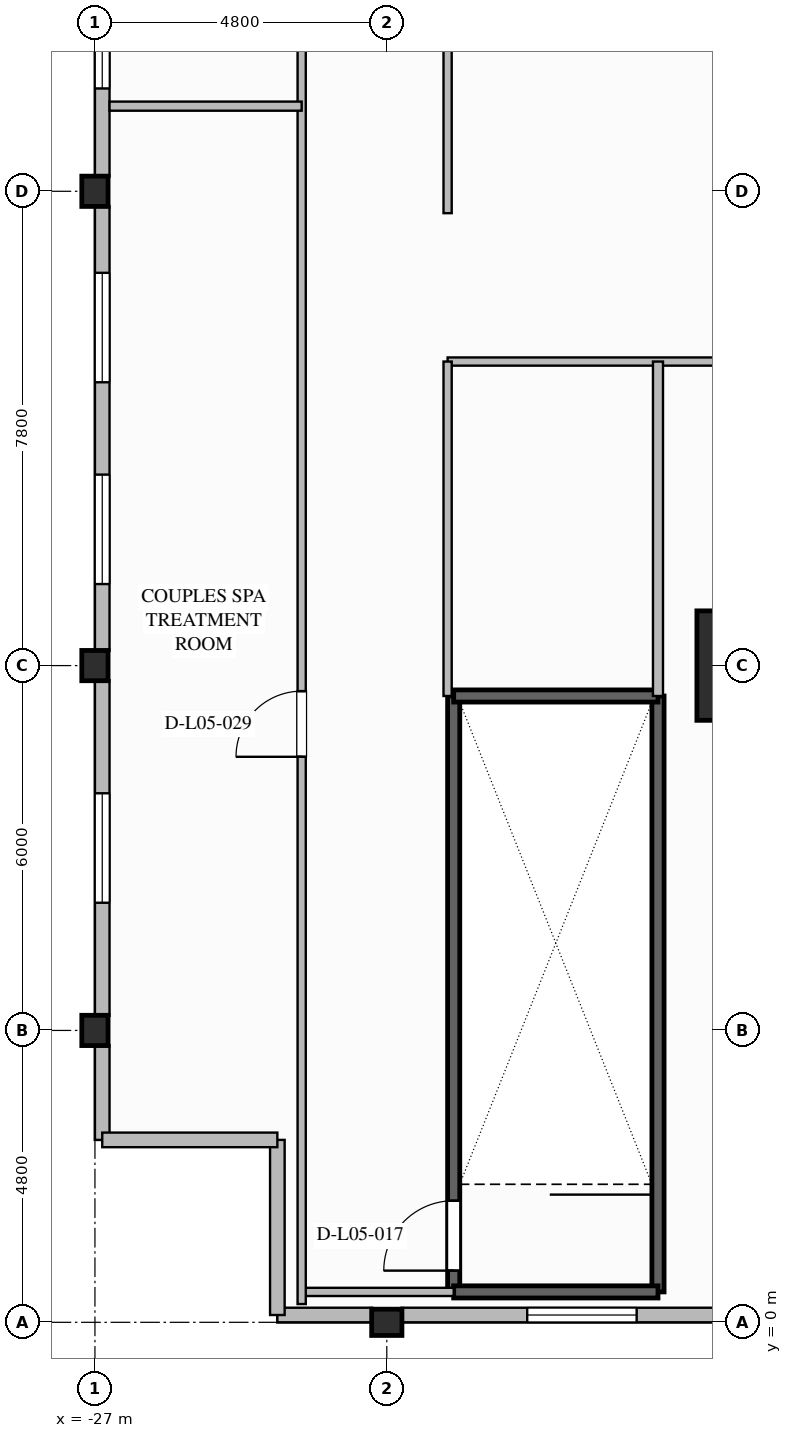
"""IFC4 building model, lengths in metres.
Left out: names, types, materials, properties, quantities, classifications, styles, units other than length and angle.
Written with IfcOpenShell. Run it as: python <this file> out.ifc"""

import sys

from ifc_helpers import new_model, si_unit, direction, frame, frame_2d, origin, origin_2d, place, context, subcontext, project, spatial, rectangle, i_section, extrude, element, fill, save


model = new_model("IFC4")
c1 = context("Model", 3, precision=1e-05, world=origin(), true_north=direction((0.0, 1.0)))
c2 = subcontext(c1, "Body", "Model", "MODEL_VIEW")
j1 = project(units=[si_unit("LENGTHUNIT", "METRE"), si_unit("PLANEANGLEUNIT", "RADIAN")], contexts=[c1])
p1 = place(None, origin())
s1 = spatial("IfcSite", under=j1, at=p1, CompositionType="ELEMENT")
p2 = place(p1, origin())
s2 = spatial("IfcBuilding", under=s1, at=p2, CompositionType="ELEMENT")
p3 = place(p2, frame((0.0, 0.0, 27.6)))
s3 = spatial("IfcBuildingStorey", under=s2, at=p3, CompositionType="ELEMENT", Elevation=27.6)
p4 = place(p3, frame((-16.2, 10.8, 0.0), z_axis=(0.0, 0.0, 1.0), x_axis=(1.0, 0.0, 0.0)))
e1 = element("IfcColumn", 1, at=p4, inside=s3, PredefinedType="COLUMN", context=c2, shape_type="SweptSolid", body=[
    extrude(rectangle(XDim=1.8, YDim=1.8, at=origin_2d()), origin(), (0.0, 0.0, 1.0), 5.6),
])
for number, where, z_axis, x_axis in (
    (2, (-27.0, 4.8, 0.0), (0.0, 0.0, 1.0), (1.0, 0.0, 0.0)),
    (3, (-27.0, 10.8, 0.0), (0.0, 0.0, 1.0), (1.0, 0.0, 0.0)),
    (4, (-27.0, 18.6, 0.0), (0.0, 0.0, 1.0), (1.0, 0.0, 0.0)),
    (5, (-22.2, 0.0, 0.0), (0.0, 0.0, 1.0), (0.0, 1.0, 0.0)),
):
    element("IfcColumn", number, at=place(p3, frame(where, z_axis=z_axis, x_axis=x_axis)), inside=s3, PredefinedType="COLUMN", context=c2, shape_type="SweptSolid", body=[
        extrude(i_section(OverallWidth=0.432, OverallDepth=0.498, WebThickness=0.056, FlangeThickness=0.089, FilletRadius=0.03, at=origin_2d()), origin(), (0.0, 0.0, 1.0), 5.32),
    ])
p5 = place(p3, frame((-26.88, 3.0, 0.0), z_axis=(0.0, 0.0, 1.0), x_axis=(0.0, 1.0, 0.0)))
e6 = element("IfcWall", 6, at=p5, inside=s3, PredefinedType="STANDARD", context=c2, shape_type="SweptSolid", body=[
    extrude(rectangle(XDim=1.559, YDim=0.24, at=frame_2d((0.78, 0.0))), origin(), (0.0, 0.0, 1.0), 5.32),
])
p6 = place(p3, frame((-26.88, 5.041, 0.0), z_axis=(0.0, 0.0, 1.0), x_axis=(0.0, 1.0, 0.0)))
e7 = element("IfcWall", 7, at=p6, inside=s3, PredefinedType="STANDARD", context=c2, shape_type="SweptSolid", body=[
    extrude(rectangle(XDim=5.518, YDim=0.24, at=frame_2d((2.759, 0.0))), origin(), (0.0, 0.0, 1.0), 4.625),
])
p7 = place(p6, frame((1.859, 0.0, 0.7)))
e8 = element("IfcOpeningElement", 8, at=p7, cuts=e7, PredefinedType="OPENING", context=c2, shape_type="SweptSolid", body=[
    extrude(rectangle(XDim=1.8, YDim=2.2, at=frame_2d((0.9, 1.1))), frame((0.0, 0.13, 0.0), z_axis=(0.0, -1.0, 0.0), x_axis=(1.0, 0.0, 0.0)), (0.0, 0.0, 1.0), 0.26),
])
p8 = place(p3, frame((-26.88, 11.041, 0.0), z_axis=(0.0, 0.0, 1.0), x_axis=(0.0, 1.0, 0.0)))
e9 = element("IfcWall", 9, at=p8, inside=s3, PredefinedType="STANDARD", context=c2, shape_type="SweptSolid", body=[
    extrude(rectangle(XDim=7.318, YDim=0.24, at=frame_2d((3.659, 0.0))), origin(), (0.0, 0.0, 1.0), 3.52),
])
p9 = place(p8, frame((1.1, 0.0, 0.7)))
e10 = element("IfcOpeningElement", 10, at=p9, cuts=e9, PredefinedType="OPENING", context=c2, shape_type="SweptSolid", body=[
    extrude(rectangle(XDim=1.8, YDim=2.0, at=frame_2d((0.9, 1.0))), frame((0.0, 0.13, 0.0), z_axis=(0.0, -1.0, 0.0), x_axis=(1.0, 0.0, 0.0)), (0.0, 0.0, 1.0), 0.26),
])
p10 = place(p8, frame((4.418, 0.0, 0.7)))
e11 = element("IfcOpeningElement", 11, at=p10, cuts=e9, PredefinedType="OPENING", context=c2, shape_type="SweptSolid", body=[
    extrude(rectangle(XDim=1.8, YDim=2.0, at=frame_2d((0.9, 1.0))), frame((0.0, 0.13, 0.0), z_axis=(0.0, -1.0, 0.0), x_axis=(1.0, 0.0, 0.0)), (0.0, 0.0, 1.0), 0.26),
])
p11 = place(p3, frame((-26.88, 18.841, 0.0), z_axis=(0.0, 0.0, 1.0), x_axis=(0.0, 1.0, 0.0)))
e12 = element("IfcWall", 12, at=p11, inside=s3, PredefinedType="STANDARD", context=c2, shape_type="SweptSolid", body=[
    extrude(rectangle(XDim=7.918, YDim=0.24, at=frame_2d((3.959, 0.0))), origin(), (0.0, 0.0, 1.0), 3.52),
])
p12 = place(p11, frame((1.45, 0.0, 0.7)))
e13 = element("IfcOpeningElement", 13, at=p12, cuts=e12, PredefinedType="OPENING", context=c2, shape_type="SweptSolid", body=[
    extrude(rectangle(XDim=1.8, YDim=2.0, at=frame_2d((0.9, 1.0))), frame((0.0, 0.13, 0.0), z_axis=(0.0, -1.0, 0.0), x_axis=(1.0, 0.0, 0.0)), (0.0, 0.0, 1.0), 0.26),
])
p13 = place(p11, frame((5.018, 0.0, 0.7)))
e14 = element("IfcOpeningElement", 14, at=p13, cuts=e12, PredefinedType="OPENING", context=c2, shape_type="SweptSolid", body=[
    extrude(rectangle(XDim=1.8, YDim=2.0, at=frame_2d((0.9, 1.0))), frame((0.0, 0.13, 0.0), z_axis=(0.0, -1.0, 0.0), x_axis=(1.0, 0.0, 0.0)), (0.0, 0.0, 1.0), 0.26),
])
p14 = place(p3, frame((-22.441, 0.12, 0.0), z_axis=(0.0, 0.0, 1.0), x_axis=(-1.0, 0.0, 0.0)))
e15 = element("IfcWall", 15, at=p14, inside=s3, PredefinedType="STANDARD", context=c2, shape_type="SweptSolid", body=[
    extrude(rectangle(XDim=1.559, YDim=0.24, at=frame_2d((0.78, 0.0))), origin(), (0.0, 0.0, 1.0), 5.32),
])
p15 = place(p3, frame((-16.441, 0.12, 0.0), z_axis=(0.0, 0.0, 1.0), x_axis=(-1.0, 0.0, 0.0)))
e16 = element("IfcWall", 16, at=p15, inside=s3, PredefinedType="STANDARD", context=c2, shape_type="SweptSolid", body=[
    extrude(rectangle(XDim=5.518, YDim=0.24, at=frame_2d((2.759, 0.0))), origin(), (0.0, 0.0, 1.0), 4.625),
])
p16 = place(p15, frame((1.65, 0.0, 0.65)))
e17 = element("IfcOpeningElement", 17, at=p16, cuts=e16, PredefinedType="OPENING", context=c2, shape_type="SweptSolid", body=[
    extrude(rectangle(XDim=1.8, YDim=2.2, at=frame_2d((0.9, 1.1))), frame((0.0, 0.13, 0.0), z_axis=(0.0, -1.0, 0.0), x_axis=(1.0, 0.0, 0.0)), (0.0, 0.0, 1.0), 0.26),
])
for number, where, z_axis, x_axis in (
    (18, (-24.0, 0.12, 0.0), (0.0, 0.0, 1.0), (0.0, 1.0, 0.0)),
    (19, (-24.0, 3.0, 0.0), (0.0, 0.0, 1.0), (-1.0, 0.0, 0.0)),
):
    element("IfcWall", number, at=place(p3, frame(where, z_axis=z_axis, x_axis=x_axis)), inside=s3, PredefinedType="STANDARD", context=c2, shape_type="SweptSolid", body=[
        extrude(rectangle(XDim=2.88, YDim=0.24, at=frame_2d((1.44, 0.0))), origin(), (0.0, 0.0, 1.0), 5.32),
    ])
p17 = place(p3, frame((-21.1, 0.5, 0.0), z_axis=(0.0, 0.0, 1.0), x_axis=(0.0, 1.0, 0.0)))
e20 = element("IfcWall", 20, at=p17, inside=s3, PredefinedType="SOLIDWALL", context=c2, shape_type="SweptSolid", body=[
    extrude(rectangle(XDim=9.8, YDim=0.2, at=frame_2d((4.9, 0.0))), origin(), (0.0, 0.0, 1.0), 5.32),
])
p18 = place(p17, frame((0.35, 0.0, 0.0)))
e21 = element("IfcOpeningElement", 21, at=p18, cuts=e20, PredefinedType="OPENING", context=c2, shape_type="SweptSolid", body=[
    extrude(rectangle(XDim=1.15, YDim=2.15, at=frame_2d((0.575, 1.075))), frame((0.0, 0.11, 0.0), z_axis=(0.0, -1.0, 0.0), x_axis=(1.0, 0.0, 0.0)), (0.0, 0.0, 1.0), 0.22),
])
p19 = place(p3, frame((-17.74, 10.3, 0.0), z_axis=(0.0, 0.0, 1.0), x_axis=(0.0, -1.0, 0.0)))
e22 = element("IfcWall", 22, at=p19, inside=s3, PredefinedType="SOLIDWALL", context=c2, shape_type="SweptSolid", body=[
    extrude(rectangle(XDim=9.8, YDim=0.2, at=frame_2d((4.9, 0.0))), origin(), (0.0, 0.0, 1.0), 5.32),
])
for number, where, z_axis, x_axis in (
    (23, (-21.1, 0.5, 0.0), (0.0, 0.0, 1.0), (1.0, 0.0, 0.0)),
    (24, (-17.74, 10.3, 0.0), (0.0, 0.0, 1.0), (-1.0, 0.0, 0.0)),
):
    element("IfcWall", number, at=place(p3, frame(where, z_axis=z_axis, x_axis=x_axis)), inside=s3, PredefinedType="SOLIDWALL", context=c2, shape_type="SweptSolid", body=[
        extrude(rectangle(XDim=3.36, YDim=0.2, at=frame_2d((1.68, 0.0))), origin(), (0.0, 0.0, 1.0), 5.32),
    ])
p20 = place(p3, frame((-21.2, 15.8, 0.0), z_axis=(0.0, 0.0, 1.0), x_axis=(1.0, 0.0, 0.0)))
e25 = element("IfcWall", 25, at=p20, inside=s3, PredefinedType="PARTITIONING", context=c2, shape_type="SweptSolid", body=[
    extrude(rectangle(XDim=46.3, YDim=0.135, at=frame_2d((23.15, 0.0))), origin(), (0.0, 0.0, 1.0), 5.32),
])
p21 = place(p20, frame((8.0, 0.0, 0.0)))
e26 = element("IfcOpeningElement", 26, at=p21, cuts=e25, PredefinedType="OPENING", context=c2, shape_type="SweptSolid", body=[
    extrude(rectangle(XDim=1.8, YDim=2.35, at=frame_2d((0.9, 1.175))), frame((0.0, 0.077, 0.0), z_axis=(0.0, -1.0, 0.0), x_axis=(1.0, 0.0, 0.0)), (0.0, 0.0, 1.0), 0.155),
])
p22 = place(p20, frame((34.2, 0.0, 0.0)))
e27 = element("IfcOpeningElement", 27, at=p22, cuts=e25, PredefinedType="OPENING", context=c2, shape_type="SweptSolid", body=[
    extrude(rectangle(XDim=1.26, YDim=2.2, at=frame_2d((0.63, 1.1))), frame((0.0, 0.077, 0.0), z_axis=(0.0, -1.0, 0.0), x_axis=(1.0, 0.0, 0.0)), (0.0, 0.0, 1.0), 0.155),
])
p23 = place(p3, frame((-17.74, 10.3, 0.0), z_axis=(0.0, 0.0, 1.0), x_axis=(0.0, 1.0, 0.0)))
e28 = element("IfcWall", 28, at=p23, inside=s3, PredefinedType="PARTITIONING", context=c2, shape_type="SweptSolid", body=[
    extrude(rectangle(XDim=5.5, YDim=0.165, at=frame_2d((2.75, 0.0))), origin(), (0.0, 0.0, 1.0), 5.32),
])
p24 = place(p3, frame((-21.2, 10.3, 0.0), z_axis=(0.0, 0.0, 1.0), x_axis=(0.0, 1.0, 0.0)))
e29 = element("IfcWall", 29, at=p24, inside=s3, PredefinedType="PARTITIONING", context=c2, shape_type="SweptSolid", body=[
    extrude(rectangle(XDim=5.5, YDim=0.135, at=frame_2d((2.75, 0.0))), origin(), (0.0, 0.0, 1.0), 5.32),
])
p25 = place(p3, frame((-21.2, 18.24, 0.0), z_axis=(0.0, 0.0, 1.0), x_axis=(0.0, 1.0, 0.0)))
e30 = element("IfcWall", 30, at=p25, inside=s3, PredefinedType="PARTITIONING", context=c2, shape_type="SweptSolid", body=[
    extrude(rectangle(XDim=17.52, YDim=0.135, at=frame_2d((8.76, 0.0))), origin(), (0.0, 0.0, 1.0), 5.32),
])
p26 = place(p3, frame((-23.6, 0.5, 0.0), z_axis=(0.0, 0.0, 1.0), x_axis=(1.0, 0.0, 0.0)))
e31 = element("IfcWall", 31, at=p26, inside=s3, PredefinedType="PARTITIONING", context=c2, shape_type="SweptSolid", body=[
    extrude(rectangle(XDim=2.5, YDim=0.135, at=frame_2d((1.25, 0.0))), origin(), (0.0, 0.0, 1.0), 5.32),
])
p27 = place(p3, frame((-23.6, 0.3, 0.0), z_axis=(0.0, 0.0, 1.0), x_axis=(0.0, 1.0, 0.0)))
e32 = element("IfcWall", 32, at=p27, inside=s3, PredefinedType="PARTITIONING", context=c2, shape_type="SweptSolid", body=[
    extrude(rectangle(XDim=37.9, YDim=0.135, at=frame_2d((18.95, 0.0))), origin(), (0.0, 0.0, 1.0), 5.32),
])
p28 = place(p27, frame((9.0, 0.0, 0.0)))
e33 = element("IfcOpeningElement", 33, at=p28, cuts=e32, PredefinedType="OPENING", context=c2, shape_type="SweptSolid", body=[
    extrude(rectangle(XDim=1.08, YDim=2.04, at=frame_2d((0.54, 1.02))), frame((0.0, 0.077, 0.0), z_axis=(0.0, -1.0, 0.0), x_axis=(1.0, 0.0, 0.0)), (0.0, 0.0, 1.0), 0.155),
])
p29 = place(p27, frame((24.0, 0.0, 0.0)))
e34 = element("IfcOpeningElement", 34, at=p29, cuts=e32, PredefinedType="OPENING", context=c2, shape_type="SweptSolid", body=[
    extrude(rectangle(XDim=1.08, YDim=2.04, at=frame_2d((0.54, 1.02))), frame((0.0, 0.077, 0.0), z_axis=(0.0, -1.0, 0.0), x_axis=(1.0, 0.0, 0.0)), (0.0, 0.0, 1.0), 0.155),
])
p30 = place(p3, frame((-26.76, 20.0, 0.0), z_axis=(0.0, 0.0, 1.0), x_axis=(1.0, 0.0, 0.0)))
e35 = element("IfcWall", 35, at=p30, inside=s3, PredefinedType="PARTITIONING", context=c2, shape_type="SweptSolid", body=[
    extrude(rectangle(XDim=3.16, YDim=0.15, at=frame_2d((1.58, 0.0))), origin(), (0.0, 0.0, 1.0), 5.32),
])
p31 = place(p7, origin())
e36 = element("IfcWindow", 36, at=p31, inside=s3, PartitioningType="SINGLE_PANEL", PredefinedType="WINDOW", context=c2, shape_type="SweptSolid", body=[
    extrude(rectangle(XDim=1.8, YDim=2.2, at=frame_2d((0.9, 1.1))), frame((0.0, 0.03, 0.0), z_axis=(0.0, -1.0, 0.0), x_axis=(1.0, 0.0, 0.0)), (0.0, 0.0, 1.0), 0.06),
])
fill(e8, e36)
p32 = place(p9, origin())
e37 = element("IfcWindow", 37, at=p32, inside=s3, PartitioningType="SINGLE_PANEL", PredefinedType="WINDOW", context=c2, shape_type="SweptSolid", body=[
    extrude(rectangle(XDim=1.8, YDim=2.0, at=frame_2d((0.9, 1.0))), frame((0.0, 0.03, 0.0), z_axis=(0.0, -1.0, 0.0), x_axis=(1.0, 0.0, 0.0)), (0.0, 0.0, 1.0), 0.06),
])
fill(e10, e37)
p33 = place(p10, origin())
e38 = element("IfcWindow", 38, at=p33, inside=s3, PartitioningType="SINGLE_PANEL", PredefinedType="WINDOW", context=c2, shape_type="SweptSolid", body=[
    extrude(rectangle(XDim=1.8, YDim=2.0, at=frame_2d((0.9, 1.0))), frame((0.0, 0.03, 0.0), z_axis=(0.0, -1.0, 0.0), x_axis=(1.0, 0.0, 0.0)), (0.0, 0.0, 1.0), 0.06),
])
fill(e11, e38)
p34 = place(p12, origin())
e39 = element("IfcWindow", 39, at=p34, inside=s3, PartitioningType="SINGLE_PANEL", PredefinedType="WINDOW", context=c2, shape_type="SweptSolid", body=[
    extrude(rectangle(XDim=1.8, YDim=2.0, at=frame_2d((0.9, 1.0))), frame((0.0, 0.03, 0.0), z_axis=(0.0, -1.0, 0.0), x_axis=(1.0, 0.0, 0.0)), (0.0, 0.0, 1.0), 0.06),
])
fill(e13, e39)
p35 = place(p16, origin())
e40 = element("IfcWindow", 40, at=p35, inside=s3, PartitioningType="SINGLE_PANEL", PredefinedType="WINDOW", context=c2, shape_type="SweptSolid", body=[
    extrude(rectangle(XDim=1.8, YDim=2.2, at=frame_2d((0.9, 1.1))), frame((0.0, 0.03, 0.0), z_axis=(0.0, -1.0, 0.0), x_axis=(1.0, 0.0, 0.0)), (0.0, 0.0, 1.0), 0.06),
])
fill(e17, e40)
p36 = place(p18, origin())
e41 = element("IfcDoor", 41, at=p36, inside=s3, OperationType="SINGLE_SWING_LEFT", PredefinedType="DOOR", context=c2, shape_type="SweptSolid", body=[
    extrude(rectangle(XDim=1.15, YDim=2.15, at=frame_2d((0.575, 1.075))), frame((0.0, 0.025, 0.0), z_axis=(0.0, -1.0, 0.0), x_axis=(1.0, 0.0, 0.0)), (0.0, 0.0, 1.0), 0.05),
])
fill(e21, e41)
p37 = place(p28, origin())
e42 = element("IfcDoor", 42, at=p37, inside=s3, OperationType="SINGLE_SWING_LEFT", PredefinedType="DOOR", context=c2, shape_type="SweptSolid", body=[
    extrude(rectangle(XDim=1.08, YDim=2.04, at=frame_2d((0.54, 1.02))), frame((0.0, 0.025, 0.0), z_axis=(0.0, -1.0, 0.0), x_axis=(1.0, 0.0, 0.0)), (0.0, 0.0, 1.0), 0.05),
])
fill(e33, e42)
save(model, sys.argv[1])
